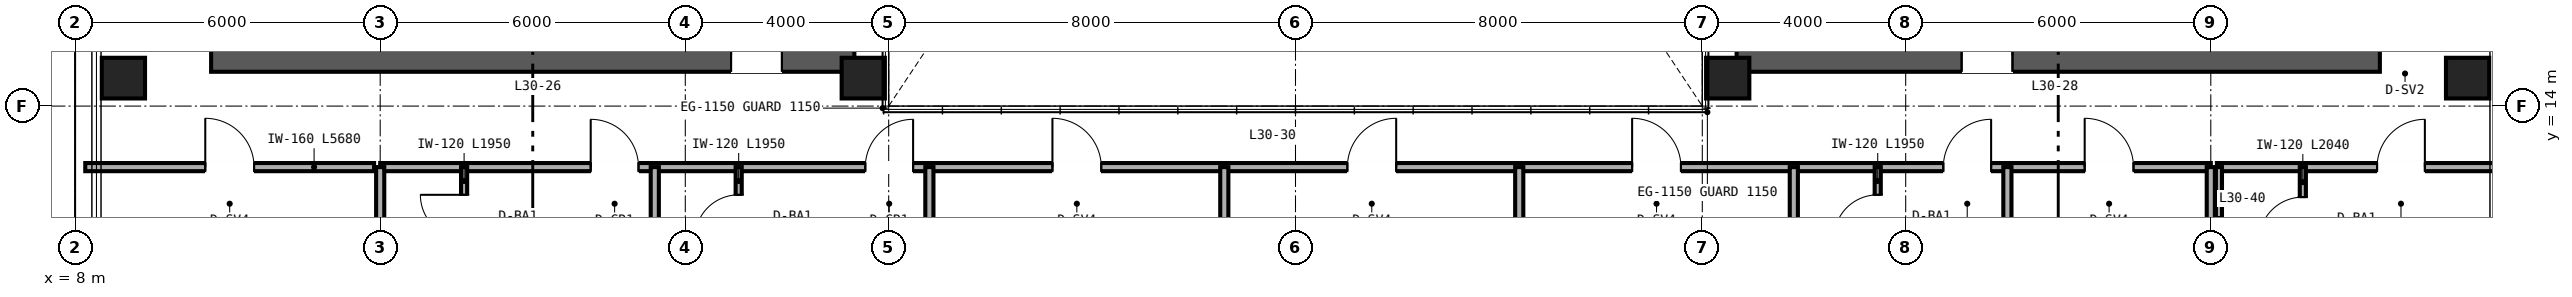
"""IFC4 building model, lengths in metres.
Left out: names, types, materials, properties, quantities, classifications, styles, units other than length and angle.
Written with IfcOpenShell. Run it as: python <this file> out.ifc"""

import sys

from ifc_helpers import new_model, si_unit, direction, frame, frame_2d, origin, origin_2d, place, context, subcontext, project, spatial, rectangle, hollow_rectangle, extrude, source, transform, mapped, element, fill, save


model = new_model("IFC4")
c1 = context("Model", 3, precision=1e-05, world=origin(), true_north=direction((0.0, 1.0)))
c2 = subcontext(c1, "Body", "Model", "MODEL_VIEW")
j1 = project(units=[si_unit("LENGTHUNIT", "METRE"), si_unit("PLANEANGLEUNIT", "RADIAN")], contexts=[c1])
p1 = place(None, origin())
s1 = spatial("IfcSite", under=j1, at=p1, CompositionType="ELEMENT")
p2 = place(p1, origin())
s2 = spatial("IfcBuilding", under=s1, at=p2, CompositionType="ELEMENT")
p3 = place(p2, frame((0.0, 0.0, 122.4)))
s3 = spatial("IfcBuildingStorey", under=s2, at=p3, CompositionType="ELEMENT", Elevation=122.4)
p4 = place(p3, frame((10.675, 15.0, 0.0), z_axis=(0.0, 0.0, 1.0), x_axis=(1.0, 0.0, 0.0)))
e1 = element("IfcWall", 1, at=p4, inside=s3, PredefinedType="SHEAR", context=c2, shape_type="SweptSolid", body=[
    extrude(rectangle(XDim=12.65, YDim=0.65, at=frame_2d((6.325, 0.0))), origin(), (0.0, 0.0, 1.0), 3.36),
])
p5 = place(p4, frame((10.225, 0.0, 0.0)))
e2 = element("IfcOpeningElement", 2, at=p5, cuts=e1, PredefinedType="OPENING", context=c2, shape_type="SweptSolid", body=[
    extrude(rectangle(XDim=1.0, YDim=2.15, at=frame_2d((0.5, 1.075))), frame((0.0, 0.335, 0.0), z_axis=(0.0, -1.0, 0.0), x_axis=(1.0, 0.0, 0.0)), (0.0, 0.0, 1.0), 0.67),
])
p6 = place(p3, frame((40.675, 15.0, 0.0), z_axis=(0.0, 0.0, 1.0), x_axis=(1.0, 0.0, 0.0)))
e3 = element("IfcWall", 3, at=p6, inside=s3, PredefinedType="SHEAR", context=c2, shape_type="SweptSolid", body=[
    extrude(rectangle(XDim=12.65, YDim=0.65, at=frame_2d((6.325, 0.0))), origin(), (0.0, 0.0, 1.0), 3.36),
])
p7 = place(p6, frame((4.425, 0.0, 0.0)))
e4 = element("IfcOpeningElement", 4, at=p7, cuts=e3, PredefinedType="OPENING", context=c2, shape_type="SweptSolid", body=[
    extrude(rectangle(XDim=1.0, YDim=2.15, at=frame_2d((0.5, 1.075))), frame((0.0, 0.335, 0.0), z_axis=(0.0, -1.0, 0.0), x_axis=(1.0, 0.0, 0.0)), (0.0, 0.0, 1.0), 0.67),
])
m1 = source(origin(), c2, "Body", "SweptSolid", [
    extrude(hollow_rectangle(XDim=0.85, YDim=0.8, WallThickness=0.032, at=origin_2d()), origin(), (0.0, 0.0, 1.0), 3.36),
])
for number, where, z_axis, x_axis in (
    (5, (8.95, 14.55, 0.0), (0.0, 0.0, 1.0), (1.0, 0.0, 0.0)),
    (6, (23.5, 14.55, 0.0), (0.0, 0.0, 1.0), (1.0, 0.0, 0.0)),
    (7, (40.5, 14.55, 0.0), (0.0, 0.0, 1.0), (1.0, 0.0, 0.0)),
    (8, (55.05, 14.55, 0.0), (0.0, 0.0, 1.0), (1.0, 0.0, 0.0)),
):
    element("IfcColumn", number, at=place(p3, frame(where, z_axis=z_axis, x_axis=x_axis)), inside=s3, PredefinedType="COLUMN", context=c2, shape_type="MappedRepresentation", body=[
        mapped(m1, transform((0.0, 0.0, 0.0), scale=1.0)),
    ])
p8 = place(p3, frame((8.2, 12.8, 0.0), z_axis=(0.0, 0.0, 1.0), x_axis=(1.0, 0.0, 0.0)))
e9 = element("IfcWall", 9, at=p8, inside=s3, PredefinedType="PARTITIONING", context=c2, shape_type="SweptSolid", body=[
    extrude(rectangle(XDim=5.68, YDim=0.16, at=frame_2d((2.84, 0.0))), origin(), (0.0, 0.0, 1.0), 3.36),
])
p9 = place(p8, frame((2.36, 0.0, 0.0)))
e10 = element("IfcOpeningElement", 10, at=p9, cuts=e9, PredefinedType="OPENING", context=c2, shape_type="SweptSolid", body=[
    extrude(rectangle(XDim=0.96, YDim=2.15, at=frame_2d((0.48, 1.075))), frame((0.0, 0.09, 0.0), z_axis=(0.0, -1.0, 0.0), x_axis=(1.0, 0.0, 0.0)), (0.0, 0.0, 1.0), 0.18),
])
p10 = place(p3, frame((50.12, 12.8, 0.0), z_axis=(0.0, 0.0, 1.0), x_axis=(1.0, 0.0, 0.0)))
e11 = element("IfcWall", 11, at=p10, inside=s3, PredefinedType="PARTITIONING", context=c2, shape_type="SweptSolid", body=[
    extrude(rectangle(XDim=5.68, YDim=0.16, at=frame_2d((2.84, 0.0))), origin(), (0.0, 0.0, 1.0), 3.36),
])
p11 = place(p10, frame((3.15, 0.0, 0.0)))
e12 = element("IfcOpeningElement", 12, at=p11, cuts=e11, PredefinedType="OPENING", context=c2, shape_type="SweptSolid", body=[
    extrude(rectangle(XDim=0.94, YDim=2.15, at=frame_2d((0.47, 1.075))), frame((0.0, 0.09, 0.0), z_axis=(0.0, -1.0, 0.0), x_axis=(1.0, 0.0, 0.0)), (0.0, 0.0, 1.0), 0.18),
])
p12 = place(p3, frame((51.81, 10.76, 0.0), z_axis=(0.0, 0.0, 1.0), x_axis=(0.0, 1.0, 0.0)))
e13 = element("IfcWall", 13, at=p12, inside=s3, PredefinedType="PARTITIONING", context=c2, shape_type="SweptSolid", body=[
    extrude(rectangle(XDim=2.04, YDim=0.12, at=frame_2d((1.02, 0.0))), origin(), (0.0, 0.0, 1.0), 3.36),
])
p13 = place(p12, frame((0.59, 0.0, 0.0)))
e14 = element("IfcOpeningElement", 14, at=p13, cuts=e13, PredefinedType="OPENING", context=c2, shape_type="SweptSolid", body=[
    extrude(rectangle(XDim=0.86, YDim=2.1, at=frame_2d((0.43, 1.05))), frame((0.0, 0.07, 0.0), z_axis=(0.0, -1.0, 0.0), x_axis=(1.0, 0.0, 0.0)), (0.0, 0.0, 1.0), 0.14),
])
p14 = place(p3, frame((50.16, 10.76, 0.0), z_axis=(0.0, 0.0, 1.0), x_axis=(0.0, 1.0, 0.0)))
e15 = element("IfcWall", 15, at=p14, inside=s3, PredefinedType="PARTITIONING", context=c2, shape_type="SweptSolid", body=[
    extrude(rectangle(XDim=2.04, YDim=0.12, at=frame_2d((1.02, 0.0))), origin(), (0.0, 0.0, 1.0), 3.36),
])
p15 = place(p3, frame((14.0, 12.8, 0.0), z_axis=(0.0, 0.0, 1.0), x_axis=(1.0, 0.0, 0.0)))
e16 = element("IfcWall", 16, at=p15, inside=s3, PredefinedType="PARTITIONING", context=c2, shape_type="SweptSolid", body=[
    extrude(rectangle(XDim=36.0, YDim=0.16, at=frame_2d((18.0, 0.0))), origin(), (0.0, 0.0, 1.0), 2.581),
])
p16 = place(p15, frame((4.14, 0.0, 0.0)))
e17 = element("IfcOpeningElement", 17, at=p16, cuts=e16, PredefinedType="OPENING", context=c2, shape_type="SweptSolid", body=[
    extrude(rectangle(XDim=0.94, YDim=2.15, at=frame_2d((0.47, 1.075))), frame((0.0, 0.09, 0.0), z_axis=(0.0, -1.0, 0.0), x_axis=(1.0, 0.0, 0.0)), (0.0, 0.0, 1.0), 0.18),
])
p17 = place(p15, frame((9.54, 0.0, 0.0)))
e18 = element("IfcOpeningElement", 18, at=p17, cuts=e16, PredefinedType="OPENING", context=c2, shape_type="SweptSolid", body=[
    extrude(rectangle(XDim=0.94, YDim=2.15, at=frame_2d((0.47, 1.075))), frame((0.0, 0.09, 0.0), z_axis=(0.0, -1.0, 0.0), x_axis=(1.0, 0.0, 0.0)), (0.0, 0.0, 1.0), 0.18),
])
p18 = place(p15, frame((13.22, 0.0, 0.0)))
e19 = element("IfcOpeningElement", 19, at=p18, cuts=e16, PredefinedType="OPENING", context=c2, shape_type="SweptSolid", body=[
    extrude(rectangle(XDim=0.96, YDim=2.15, at=frame_2d((0.48, 1.075))), frame((0.0, 0.09, 0.0), z_axis=(0.0, -1.0, 0.0), x_axis=(1.0, 0.0, 0.0)), (0.0, 0.0, 1.0), 0.18),
])
p19 = place(p15, frame((19.02, 0.0, 0.0)))
e20 = element("IfcOpeningElement", 20, at=p19, cuts=e16, PredefinedType="OPENING", context=c2, shape_type="SweptSolid", body=[
    extrude(rectangle(XDim=0.96, YDim=2.15, at=frame_2d((0.48, 1.075))), frame((0.0, 0.09, 0.0), z_axis=(0.0, -1.0, 0.0), x_axis=(1.0, 0.0, 0.0)), (0.0, 0.0, 1.0), 0.18),
])
p20 = place(p15, frame((24.62, 0.0, 0.0)))
e21 = element("IfcOpeningElement", 21, at=p20, cuts=e16, PredefinedType="OPENING", context=c2, shape_type="SweptSolid", body=[
    extrude(rectangle(XDim=0.96, YDim=2.15, at=frame_2d((0.48, 1.075))), frame((0.0, 0.09, 0.0), z_axis=(0.0, -1.0, 0.0), x_axis=(1.0, 0.0, 0.0)), (0.0, 0.0, 1.0), 0.18),
])
p21 = place(p15, frame((30.74, 0.0, 0.0)))
e22 = element("IfcOpeningElement", 22, at=p21, cuts=e16, PredefinedType="OPENING", context=c2, shape_type="SweptSolid", body=[
    extrude(rectangle(XDim=0.94, YDim=2.15, at=frame_2d((0.47, 1.075))), frame((0.0, 0.09, 0.0), z_axis=(0.0, -1.0, 0.0), x_axis=(1.0, 0.0, 0.0)), (0.0, 0.0, 1.0), 0.18),
])
p22 = place(p15, frame((33.52, 0.0, 0.0)))
e23 = element("IfcOpeningElement", 23, at=p22, cuts=e16, PredefinedType="OPENING", context=c2, shape_type="SweptSolid", body=[
    extrude(rectangle(XDim=0.96, YDim=2.15, at=frame_2d((0.48, 1.075))), frame((0.0, 0.09, 0.0), z_axis=(0.0, -1.0, 0.0), x_axis=(1.0, 0.0, 0.0)), (0.0, 0.0, 1.0), 0.18),
])
for number, where, z_axis, x_axis in (
    (24, (14.0, 2.36, 0.0), (0.0, 0.0, 1.0), (0.0, 1.0, 0.0)),
    (25, (50.0, 2.36, 0.0), (0.0, 0.0, 1.0), (0.0, 1.0, 0.0)),
    (26, (19.4, 2.36, 0.0), (0.0, 0.0, 1.0), (0.0, 1.0, 0.0)),
):
    element("IfcWall", number, at=place(p3, frame(where, z_axis=z_axis, x_axis=x_axis)), inside=s3, PredefinedType="PARTITIONING", context=c2, shape_type="SweptSolid", body=[
        extrude(rectangle(XDim=10.44, YDim=0.16, at=frame_2d((5.22, 0.0))), origin(), (0.0, 0.0, 1.0), 2.667),
    ])
p23 = place(p3, frame((15.65, 10.85, 0.0), z_axis=(0.0, 0.0, 1.0), x_axis=(0.0, 1.0, 0.0)))
e27 = element("IfcWall", 27, at=p23, inside=s3, PredefinedType="PARTITIONING", context=c2, shape_type="SweptSolid", body=[
    extrude(rectangle(XDim=1.95, YDim=0.12, at=frame_2d((0.975, 0.0))), origin(), (0.0, 0.0, 1.0), 3.36),
])
p24 = place(p23, frame((0.545, 0.0, 0.0)))
e28 = element("IfcOpeningElement", 28, at=p24, cuts=e27, PredefinedType="OPENING", context=c2, shape_type="SweptSolid", body=[
    extrude(rectangle(XDim=0.86, YDim=2.1, at=frame_2d((0.43, 1.05))), frame((0.0, 0.07, 0.0), z_axis=(0.0, -1.0, 0.0), x_axis=(1.0, 0.0, 0.0)), (0.0, 0.0, 1.0), 0.14),
])
p25 = place(p3, frame((24.8, 2.36, 0.0), z_axis=(0.0, 0.0, 1.0), x_axis=(0.0, 1.0, 0.0)))
e29 = element("IfcWall", 29, at=p25, inside=s3, PredefinedType="PARTITIONING", context=c2, shape_type="SweptSolid", body=[
    extrude(rectangle(XDim=10.44, YDim=0.16, at=frame_2d((5.22, 0.0))), origin(), (0.0, 0.0, 1.0), 2.433),
])
p26 = place(p3, frame((21.05, 10.85, 0.0), z_axis=(0.0, 0.0, 1.0), x_axis=(0.0, 1.0, 0.0)))
e30 = element("IfcWall", 30, at=p26, inside=s3, PredefinedType="PARTITIONING", context=c2, shape_type="SweptSolid", body=[
    extrude(rectangle(XDim=1.95, YDim=0.12, at=frame_2d((0.975, 0.0))), origin(), (0.0, 0.0, 1.0), 3.36),
])
p27 = place(p26, frame((0.545, 0.0, 0.0)))
e31 = element("IfcOpeningElement", 31, at=p27, cuts=e30, PredefinedType="OPENING", context=c2, shape_type="SweptSolid", body=[
    extrude(rectangle(XDim=0.86, YDim=2.1, at=frame_2d((0.43, 1.05))), frame((0.0, 0.07, 0.0), z_axis=(0.0, -1.0, 0.0), x_axis=(1.0, 0.0, 0.0)), (0.0, 0.0, 1.0), 0.14),
])
for number, where, z_axis, x_axis in (
    (32, (30.6, 2.36, 0.0), (0.0, 0.0, 1.0), (0.0, 1.0, 0.0)),
    (33, (36.4, 2.36, 0.0), (0.0, 0.0, 1.0), (0.0, 1.0, 0.0)),
):
    element("IfcWall", number, at=place(p3, frame(where, z_axis=z_axis, x_axis=x_axis)), inside=s3, PredefinedType="PARTITIONING", context=c2, shape_type="SweptSolid", body=[
        extrude(rectangle(XDim=10.44, YDim=0.16, at=frame_2d((5.22, 0.0))), origin(), (0.0, 0.0, 1.0), 2.433),
    ])
p28 = place(p3, frame((41.8, 2.36, 0.0), z_axis=(0.0, 0.0, 1.0), x_axis=(0.0, 1.0, 0.0)))
e34 = element("IfcWall", 34, at=p28, inside=s3, PredefinedType="PARTITIONING", context=c2, shape_type="SweptSolid", body=[
    extrude(rectangle(XDim=10.44, YDim=0.16, at=frame_2d((5.22, 0.0))), origin(), (0.0, 0.0, 1.0), 2.823),
])
p29 = place(p3, frame((46.0, 2.36, 0.0), z_axis=(0.0, 0.0, 1.0), x_axis=(0.0, 1.0, 0.0)))
e35 = element("IfcWall", 35, at=p29, inside=s3, PredefinedType="PARTITIONING", context=c2, shape_type="SweptSolid", body=[
    extrude(rectangle(XDim=10.44, YDim=0.16, at=frame_2d((5.22, 0.0))), origin(), (0.0, 0.0, 1.0), 2.667),
])
p30 = place(p3, frame((43.45, 10.85, 0.0), z_axis=(0.0, 0.0, 1.0), x_axis=(0.0, 1.0, 0.0)))
e36 = element("IfcWall", 36, at=p30, inside=s3, PredefinedType="PARTITIONING", context=c2, shape_type="SweptSolid", body=[
    extrude(rectangle(XDim=1.95, YDim=0.12, at=frame_2d((0.975, 0.0))), origin(), (0.0, 0.0, 1.0), 3.36),
])
p31 = place(p30, frame((0.545, 0.0, 0.0)))
e37 = element("IfcOpeningElement", 37, at=p31, cuts=e36, PredefinedType="OPENING", context=c2, shape_type="SweptSolid", body=[
    extrude(rectangle(XDim=0.86, YDim=2.1, at=frame_2d((0.43, 1.05))), frame((0.0, 0.07, 0.0), z_axis=(0.0, -1.0, 0.0), x_axis=(1.0, 0.0, 0.0)), (0.0, 0.0, 1.0), 0.14),
])
m2 = source(origin(), c2, "Body", "SweptSolid", [
    extrude(rectangle(XDim=1.0, YDim=2.15, at=frame_2d((0.5, 1.075))), frame((0.0, 0.025, 0.0), z_axis=(0.0, -1.0, 0.0), x_axis=(1.0, 0.0, 0.0)), (0.0, 0.0, 1.0), 0.05),
])
p32 = place(p5, origin())
e38 = element("IfcDoor", 38, at=p32, inside=s3, OperationType="SINGLE_SWING_LEFT", PredefinedType="DOOR", context=c2, shape_type="MappedRepresentation", body=[
    mapped(m2, transform((0.0, 0.0, 0.0), scale=1.0)),
])
fill(e2, e38)
p33 = place(p7, origin())
e39 = element("IfcDoor", 39, at=p33, inside=s3, OperationType="SINGLE_SWING_RIGHT", PredefinedType="DOOR", context=c2, shape_type="MappedRepresentation", body=[
    mapped(m2, transform((0.0, 0.0, 0.0), scale=1.0)),
])
fill(e4, e39)
m3 = source(origin(), c2, "Body", "SweptSolid", [
    extrude(rectangle(XDim=0.96, YDim=2.15, at=frame_2d((0.48, 1.075))), frame((0.0, 0.025, 0.0), z_axis=(0.0, -1.0, 0.0), x_axis=(1.0, 0.0, 0.0)), (0.0, 0.0, 1.0), 0.05),
])
p34 = place(p9, origin())
e40 = element("IfcDoor", 40, at=p34, inside=s3, OperationType="SINGLE_SWING_LEFT", PredefinedType="DOOR", context=c2, shape_type="MappedRepresentation", body=[
    mapped(m3, transform((0.0, 0.0, 0.0), scale=1.0)),
])
fill(e10, e40)
m4 = source(origin(), c2, "Body", "SweptSolid", [
    extrude(rectangle(XDim=0.86, YDim=2.1, at=frame_2d((0.43, 1.05))), frame((0.0, 0.025, 0.0), z_axis=(0.0, -1.0, 0.0), x_axis=(1.0, 0.0, 0.0)), (0.0, 0.0, 1.0), 0.05),
])
p35 = place(p13, origin())
e41 = element("IfcDoor", 41, at=p35, inside=s3, OperationType="SINGLE_SWING_LEFT", PredefinedType="DOOR", context=c2, shape_type="MappedRepresentation", body=[
    mapped(m4, transform((0.0, 0.0, 0.0), scale=1.0)),
])
fill(e14, e41)
m5 = source(origin(), c2, "Body", "SweptSolid", [
    extrude(rectangle(XDim=0.94, YDim=2.15, at=frame_2d((0.47, 1.075))), frame((0.0, 0.025, 0.0), z_axis=(0.0, -1.0, 0.0), x_axis=(1.0, 0.0, 0.0)), (0.0, 0.0, 1.0), 0.05),
])
p36 = place(p11, origin())
e42 = element("IfcDoor", 42, at=p36, inside=s3, OperationType="SINGLE_SWING_RIGHT", PredefinedType="DOOR", context=c2, shape_type="MappedRepresentation", body=[
    mapped(m5, transform((0.0, 0.0, 0.0), scale=1.0)),
])
fill(e12, e42)
p37 = place(p24, origin())
e43 = element("IfcDoor", 43, at=p37, inside=s3, OperationType="SINGLE_SWING_RIGHT", PredefinedType="DOOR", context=c2, shape_type="MappedRepresentation", body=[
    mapped(m4, transform((0.0, 0.0, 0.0), scale=1.0)),
])
fill(e28, e43)
p38 = place(p27, origin())
e44 = element("IfcDoor", 44, at=p38, inside=s3, OperationType="SINGLE_SWING_LEFT", PredefinedType="DOOR", context=c2, shape_type="MappedRepresentation", body=[
    mapped(m4, transform((0.0, 0.0, 0.0), scale=1.0)),
])
fill(e31, e44)
p39 = place(p31, origin())
e45 = element("IfcDoor", 45, at=p39, inside=s3, OperationType="SINGLE_SWING_LEFT", PredefinedType="DOOR", context=c2, shape_type="MappedRepresentation", body=[
    mapped(m4, transform((0.0, 0.0, 0.0), scale=1.0)),
])
fill(e37, e45)
p40 = place(p16, origin())
e46 = element("IfcDoor", 46, at=p40, inside=s3, OperationType="SINGLE_SWING_LEFT", PredefinedType="DOOR", context=c2, shape_type="MappedRepresentation", body=[
    mapped(m5, transform((0.0, 0.0, 0.0), scale=1.0)),
])
fill(e17, e46)
p41 = place(p17, origin())
e47 = element("IfcDoor", 47, at=p41, inside=s3, OperationType="SINGLE_SWING_RIGHT", PredefinedType="DOOR", context=c2, shape_type="MappedRepresentation", body=[
    mapped(m5, transform((0.0, 0.0, 0.0), scale=1.0)),
])
fill(e18, e47)
p42 = place(p18, origin())
e48 = element("IfcDoor", 48, at=p42, inside=s3, OperationType="SINGLE_SWING_LEFT", PredefinedType="DOOR", context=c2, shape_type="MappedRepresentation", body=[
    mapped(m3, transform((0.0, 0.0, 0.0), scale=1.0)),
])
fill(e19, e48)
p43 = place(p19, origin())
e49 = element("IfcDoor", 49, at=p43, inside=s3, OperationType="SINGLE_SWING_RIGHT", PredefinedType="DOOR", context=c2, shape_type="MappedRepresentation", body=[
    mapped(m3, transform((0.0, 0.0, 0.0), scale=1.0)),
])
fill(e20, e49)
p44 = place(p20, origin())
e50 = element("IfcDoor", 50, at=p44, inside=s3, OperationType="SINGLE_SWING_LEFT", PredefinedType="DOOR", context=c2, shape_type="MappedRepresentation", body=[
    mapped(m3, transform((0.0, 0.0, 0.0), scale=1.0)),
])
fill(e21, e50)
p45 = place(p21, origin())
e51 = element("IfcDoor", 51, at=p45, inside=s3, OperationType="SINGLE_SWING_RIGHT", PredefinedType="DOOR", context=c2, shape_type="MappedRepresentation", body=[
    mapped(m5, transform((0.0, 0.0, 0.0), scale=1.0)),
])
fill(e22, e51)
p46 = place(p22, origin())
e52 = element("IfcDoor", 52, at=p46, inside=s3, OperationType="SINGLE_SWING_LEFT", PredefinedType="DOOR", context=c2, shape_type="MappedRepresentation", body=[
    mapped(m3, transform((0.0, 0.0, 0.0), scale=1.0)),
])
fill(e23, e52)
save(model, sys.argv[1])
